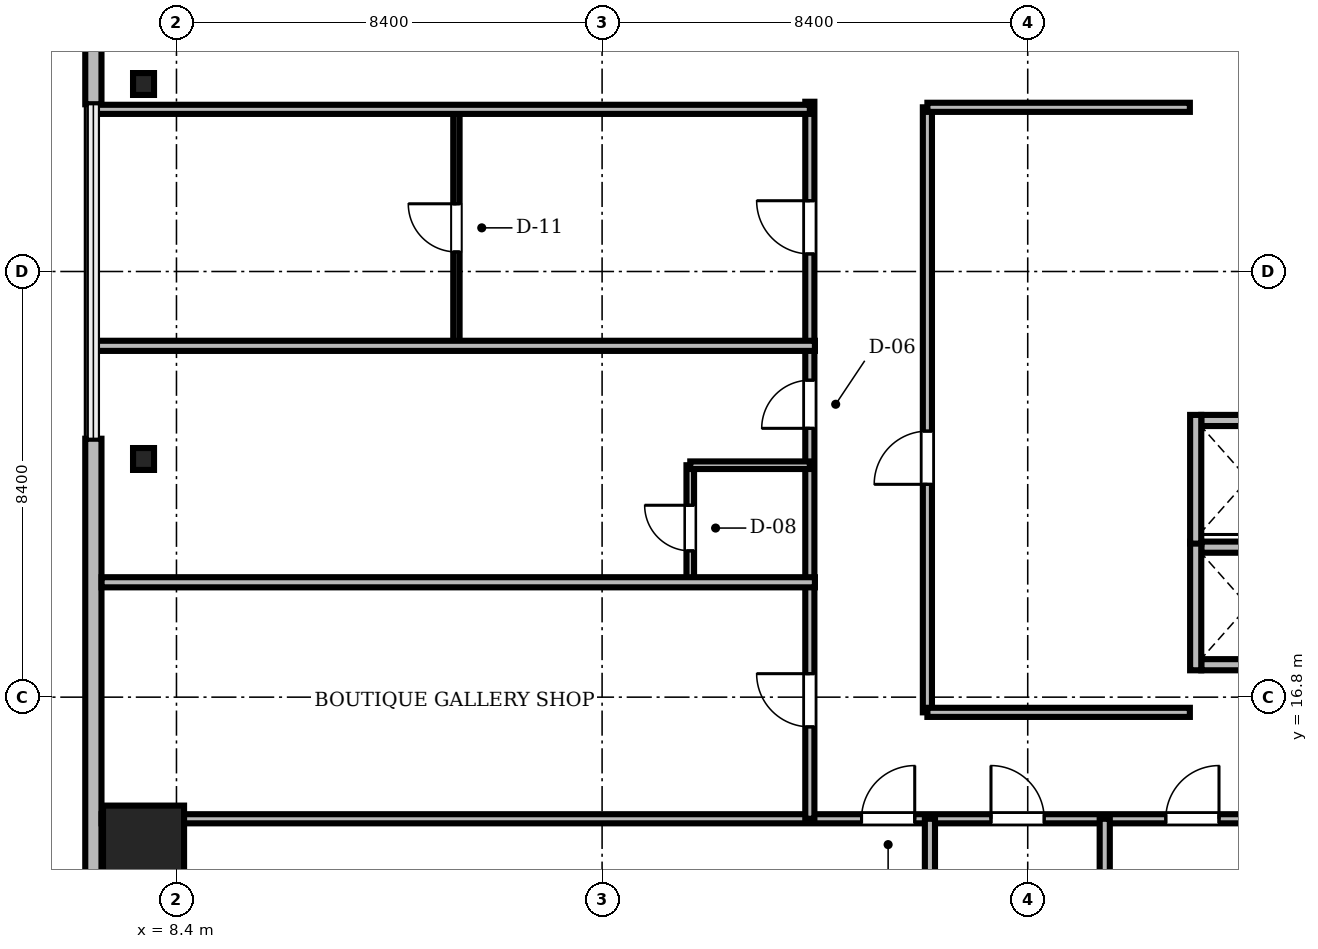
"""IFC4 building model, lengths in metres.
Left out: names, types, materials, properties, quantities, classifications, styles, units other than length and angle.
Written with IfcOpenShell. Run it as: python <this file> out.ifc"""

import sys

from ifc_helpers import new_model, si_unit, direction, frame, frame_2d, origin, origin_2d, place, context, subcontext, project, spatial, rectangle, i_section, extrude, source, transform, mapped, element, fill, save


model = new_model("IFC4")
c1 = context("Model", 3, precision=1e-05, world=origin(), true_north=direction((0.0, 1.0)))
c2 = subcontext(c1, "Body", "Model", "MODEL_VIEW")
j1 = project(units=[si_unit("LENGTHUNIT", "METRE"), si_unit("PLANEANGLEUNIT", "RADIAN")], contexts=[c1])
p1 = place(None, origin())
s1 = spatial("IfcSite", under=j1, at=p1, CompositionType="ELEMENT")
p2 = place(p1, origin())
s2 = spatial("IfcBuilding", under=s1, at=p2, CompositionType="ELEMENT")
p3 = place(p2, frame((0.0, 0.0, 140.9)))
s3 = spatial("IfcBuildingStorey", under=s2, at=p3, CompositionType="ELEMENT", Elevation=140.9)
m1 = source(origin(), c2, "Body", "SweptSolid", [
    extrude(rectangle(XDim=1.6, YDim=1.6, at=origin_2d()), origin(), (0.0, 0.0, 1.0), 3.46),
])
p4 = place(p3, frame((7.75, 13.86, 0.0), z_axis=(0.0, 0.0, 1.0), x_axis=(1.0, 0.0, 0.0)))
e1 = element("IfcColumn", 1, at=p4, inside=s3, PredefinedType="COLUMN", context=c2, shape_type="MappedRepresentation", body=[
    mapped(m1, transform((0.0, 0.0, 0.0), scale=1.0)),
])
m2 = source(origin(), c2, "Body", "SweptSolid", [
    extrude(i_section(OverallWidth=0.414, OverallDepth=0.432, WebThickness=0.026, FlangeThickness=0.04, FilletRadius=0.015, at=origin_2d()), origin(), (0.0, 0.0, 1.0), 3.46),
])
for number, where, z_axis, x_axis in (
    (2, (7.75, 28.9, 0.0), (0.0, 0.0, 1.0), (1.0, 0.0, 0.0)),
    (3, (7.75, 21.5, 0.0), (0.0, 0.0, 1.0), (1.0, 0.0, 0.0)),
):
    element("IfcColumn", number, at=place(p3, frame(where, z_axis=z_axis, x_axis=x_axis)), inside=s3, PredefinedType="COLUMN", context=c2, shape_type="MappedRepresentation", body=[
        mapped(m2, transform((0.0, 0.0, 0.0), scale=1.0)),
    ])
m3 = source(origin(), c2, "Body", "SweptSolid", [
    extrude(rectangle(XDim=15.6, YDim=0.32, at=frame_2d((7.8, 0.0))), origin(), (0.0, 0.0, 1.0), 3.46),
])
p5 = place(p3, frame((6.76, 44.1, 0.0), z_axis=(0.0, 0.0, 1.0), x_axis=(0.0, -1.0, 0.0)))
e4 = element("IfcWall", 4, at=p5, inside=s3, PredefinedType="SOLIDWALL", context=c2, shape_type="MappedRepresentation", body=[
    mapped(m3, transform((0.0, 0.0, 0.0), scale=1.0)),
])
m4 = source(origin(), c2, "Body", "SweptSolid", [
    extrude(rectangle(XDim=1.4, YDim=2.3, at=frame_2d((0.7, 1.15))), frame((0.0, 0.17, 0.0), z_axis=(0.0, -1.0, 0.0), x_axis=(1.0, 0.0, 0.0)), (0.0, 0.0, 1.0), 0.34),
])
p6 = place(p5, frame((9.61, 0.0, 0.0)))
e5 = element("IfcOpeningElement", 5, at=p6, cuts=e4, PredefinedType="OPENING", context=c2, shape_type="MappedRepresentation", body=[
    mapped(m4, transform((0.0, 0.0, 0.0), scale=1.0)),
])
m5 = source(origin(), c2, "Body", "SweptSolid", [
    extrude(rectangle(XDim=2.8, YDim=2.4, at=frame_2d((1.4, 1.2))), frame((0.0, 0.17, 0.0), z_axis=(0.0, -1.0, 0.0), x_axis=(1.0, 0.0, 0.0)), (0.0, 0.0, 1.0), 0.34),
])
p7 = place(p5, frame((2.705, 0.0, 0.72)))
e6 = element("IfcOpeningElement", 6, at=p7, cuts=e4, PredefinedType="OPENING", context=c2, shape_type="MappedRepresentation", body=[
    mapped(m5, transform((0.0, 0.0, 0.0), scale=1.0)),
])
m6 = source(origin(), c2, "Body", "SweptSolid", [
    extrude(rectangle(XDim=15.6, YDim=0.32, at=frame_2d((7.8, 0.0))), origin(), (0.0, 0.0, 1.0), 3.46),
])
p8 = place(p3, frame((6.76, 21.9, 0.0), z_axis=(0.0, 0.0, 1.0), x_axis=(0.0, -1.0, 0.0)))
e7 = element("IfcWall", 7, at=p8, inside=s3, PredefinedType="SOLIDWALL", context=c2, shape_type="MappedRepresentation", body=[
    mapped(m6, transform((0.0, 0.0, 0.0), scale=1.0)),
])
p9 = place(p8, frame((10.095, 0.0, 0.72)))
e8 = element("IfcOpeningElement", 8, at=p9, cuts=e7, PredefinedType="OPENING", context=c2, shape_type="MappedRepresentation", body=[
    mapped(m5, transform((0.0, 0.0, 0.0), scale=1.0)),
])
m7 = source(origin(), c2, "Body", "SweptSolid", [
    extrude(rectangle(XDim=1.85, YDim=0.22, at=frame_2d((0.925, 0.0))), origin(), (0.0, 0.0, 1.0), 3.46),
])
for number, where, z_axis, x_axis in (
    (9, (28.625, 17.44, 0.0), (0.0, 0.0, 1.0), (1.0, 0.0, 0.0)),
    (10, (28.625, 19.76, 0.0), (0.0, 0.0, 1.0), (1.0, 0.0, 0.0)),
):
    element("IfcWall", number, at=place(p3, frame(where, z_axis=z_axis, x_axis=x_axis)), inside=s3, PredefinedType="SOLIDWALL", context=c2, shape_type="MappedRepresentation", body=[
        mapped(m7, transform((0.0, 0.0, 0.0), scale=1.0)),
    ])
m8 = source(origin(), c2, "Body", "SweptSolid", [
    extrude(rectangle(XDim=2.54, YDim=0.22, at=frame_2d((1.27, 0.0))), origin(), (0.0, 0.0, 1.0), 3.46),
])
p10 = place(p3, frame((28.515, 17.33, 0.0), z_axis=(0.0, 0.0, 1.0), x_axis=(0.0, 1.0, 0.0)))
e11 = element("IfcWall", 11, at=p10, inside=s3, PredefinedType="SOLIDWALL", context=c2, shape_type="MappedRepresentation", body=[
    mapped(m8, transform((0.0, 0.0, 0.0), scale=1.0)),
])
p11 = place(p3, frame((28.625, 22.26, 0.0), z_axis=(0.0, 0.0, 1.0), x_axis=(1.0, 0.0, 0.0)))
e12 = element("IfcWall", 12, at=p11, inside=s3, PredefinedType="SOLIDWALL", context=c2, shape_type="MappedRepresentation", body=[
    mapped(m7, transform((0.0, 0.0, 0.0), scale=1.0)),
])
p12 = place(p3, frame((28.515, 19.83, 0.0), z_axis=(0.0, 0.0, 1.0), x_axis=(0.0, 1.0, 0.0)))
e13 = element("IfcWall", 13, at=p12, inside=s3, PredefinedType="SOLIDWALL", context=c2, shape_type="MappedRepresentation", body=[
    mapped(m8, transform((0.0, 0.0, 0.0), scale=1.0)),
])
m9 = source(origin(), c2, "Body", "SweptSolid", [
    extrude(rectangle(XDim=46.156, YDim=0.18, at=frame_2d((23.078, 0.0))), origin(), (0.0, 0.0, 1.0), 2.702),
])
p13 = place(p3, frame((6.922, 14.4, 0.0), z_axis=(0.0, 0.0, 1.0), x_axis=(1.0, 0.0, 0.0)))
e14 = element("IfcWall", 14, at=p13, inside=s3, PredefinedType="PARTITIONING", context=c2, shape_type="MappedRepresentation", body=[
    mapped(m9, transform((0.0, 0.0, 0.0), scale=1.0)),
])
m10 = source(origin(), c2, "Body", "SweptSolid", [
    extrude(rectangle(XDim=1.05, YDim=2.2, at=frame_2d((0.525, 1.1))), frame((0.0, 0.1, 0.0), z_axis=(0.0, -1.0, 0.0), x_axis=(1.0, 0.0, 0.0)), (0.0, 0.0, 1.0), 0.2),
])
p14 = place(p13, frame((14.998, 0.0, 0.0)))
e15 = element("IfcOpeningElement", 15, at=p14, cuts=e14, PredefinedType="OPENING", context=c2, shape_type="MappedRepresentation", body=[
    mapped(m10, transform((0.0, 0.0, 0.0), scale=1.0)),
])
p15 = place(p13, frame((17.553, 0.0, 0.0)))
e16 = element("IfcOpeningElement", 16, at=p15, cuts=e14, PredefinedType="OPENING", context=c2, shape_type="MappedRepresentation", body=[
    mapped(m10, transform((0.0, 0.0, 0.0), scale=1.0)),
])
p16 = place(p13, frame((21.003, 0.0, 0.0)))
e17 = element("IfcOpeningElement", 17, at=p16, cuts=e14, PredefinedType="OPENING", context=c2, shape_type="MappedRepresentation", body=[
    mapped(m10, transform((0.0, 0.0, 0.0), scale=1.0)),
])
p17 = place(p13, frame((24.532, 0.0, 0.0)))
e18 = element("IfcOpeningElement", 18, at=p17, cuts=e14, PredefinedType="OPENING", context=c2, shape_type="MappedRepresentation", body=[
    mapped(m10, transform((0.0, 0.0, 0.0), scale=1.0)),
])
p18 = place(p13, frame((28.338, 0.0, 0.0)))
e19 = element("IfcOpeningElement", 19, at=p18, cuts=e14, PredefinedType="OPENING", context=c2, shape_type="MappedRepresentation", body=[
    mapped(m10, transform((0.0, 0.0, 0.0), scale=1.0)),
])
p19 = place(p13, frame((32.341, 0.0, 0.0)))
e20 = element("IfcOpeningElement", 20, at=p19, cuts=e14, PredefinedType="OPENING", context=c2, shape_type="MappedRepresentation", body=[
    mapped(m10, transform((0.0, 0.0, 0.0), scale=1.0)),
])
p20 = place(p13, frame((37.094, 0.0, 0.0)))
e21 = element("IfcOpeningElement", 21, at=p20, cuts=e14, PredefinedType="OPENING", context=c2, shape_type="MappedRepresentation", body=[
    mapped(m10, transform((0.0, 0.0, 0.0), scale=1.0)),
])
p21 = place(p13, frame((41.828, 0.0, 0.0)))
e22 = element("IfcOpeningElement", 22, at=p21, cuts=e14, PredefinedType="OPENING", context=c2, shape_type="MappedRepresentation", body=[
    mapped(m10, transform((0.0, 0.0, 0.0), scale=1.0)),
])
m11 = source(origin(), c2, "Body", "SweptSolid", [
    extrude(rectangle(XDim=14.15, YDim=0.18, at=frame_2d((7.075, 0.0))), origin(), (0.0, 0.0, 1.0), 2.852),
])
p22 = place(p3, frame((20.9, 14.4, 0.0), z_axis=(0.0, 0.0, 1.0), x_axis=(0.0, 1.0, 0.0)))
e23 = element("IfcWall", 23, at=p22, inside=s3, PredefinedType="PARTITIONING", context=c2, shape_type="MappedRepresentation", body=[
    mapped(m11, transform((0.0, 0.0, 0.0), scale=1.0)),
])
p23 = place(p22, frame((1.813, 0.0, 0.0)))
e24 = element("IfcOpeningElement", 24, at=p23, cuts=e23, PredefinedType="OPENING", context=c2, shape_type="MappedRepresentation", body=[
    mapped(m10, transform((0.0, 0.0, 0.0), scale=1.0)),
])
m12 = source(origin(), c2, "Body", "SweptSolid", [
    extrude(rectangle(XDim=0.95, YDim=2.15, at=frame_2d((0.475, 1.075))), frame((0.0, 0.1, 0.0), z_axis=(0.0, -1.0, 0.0), x_axis=(1.0, 0.0, 0.0)), (0.0, 0.0, 1.0), 0.2),
])
p24 = place(p22, frame((7.705, 0.0, 0.0)))
e25 = element("IfcOpeningElement", 25, at=p24, cuts=e23, PredefinedType="OPENING", context=c2, shape_type="MappedRepresentation", body=[
    mapped(m12, transform((0.0, 0.0, 0.0), scale=1.0)),
])
p25 = place(p22, frame((11.146, 0.0, 0.0)))
e26 = element("IfcOpeningElement", 26, at=p25, cuts=e23, PredefinedType="OPENING", context=c2, shape_type="MappedRepresentation", body=[
    mapped(m10, transform((0.0, 0.0, 0.0), scale=1.0)),
])
m13 = source(origin(), c2, "Body", "SweptSolid", [
    extrude(rectangle(XDim=11.94, YDim=0.18, at=frame_2d((5.97, 0.0))), origin(), (0.0, 0.0, 1.0), 2.852),
])
p26 = place(p3, frame((23.22, 16.5, 0.0), z_axis=(0.0, 0.0, 1.0), x_axis=(0.0, 1.0, 0.0)))
e27 = element("IfcWall", 27, at=p26, inside=s3, PredefinedType="PARTITIONING", context=c2, shape_type="MappedRepresentation", body=[
    mapped(m13, transform((0.0, 0.0, 0.0), scale=1.0)),
])
p27 = place(p26, frame((4.5, 0.0, 0.0)))
e28 = element("IfcOpeningElement", 28, at=p27, cuts=e27, PredefinedType="OPENING", context=c2, shape_type="MappedRepresentation", body=[
    mapped(m10, transform((0.0, 0.0, 0.0), scale=1.0)),
])
m14 = source(origin(), c2, "Body", "SweptSolid", [
    extrude(rectangle(XDim=4.667, YDim=0.125, at=frame_2d((2.333, 0.0))), origin(), (0.0, 0.0, 1.0), 2.852),
])
p28 = place(p3, frame((13.925, 23.733, 0.0), z_axis=(0.0, 0.0, 1.0), x_axis=(0.0, 1.0, 0.0)))
e29 = element("IfcWall", 29, at=p28, inside=s3, PredefinedType="PARTITIONING", context=c2, shape_type="MappedRepresentation", body=[
    mapped(m14, transform((0.0, 0.0, 0.0), scale=1.0)),
])
m15 = source(origin(), c2, "Body", "SweptSolid", [
    extrude(rectangle(XDim=0.95, YDim=2.15, at=frame_2d((0.475, 1.075))), frame((0.0, 0.073, 0.0), z_axis=(0.0, -1.0, 0.0), x_axis=(1.0, 0.0, 0.0)), (0.0, 0.0, 1.0), 0.145),
])
p29 = place(p28, frame((1.853, 0.0, 0.0)))
e30 = element("IfcOpeningElement", 30, at=p29, cuts=e29, PredefinedType="OPENING", context=c2, shape_type="MappedRepresentation", body=[
    mapped(m15, transform((0.0, 0.0, 0.0), scale=1.0)),
])
m16 = source(origin(), c2, "Body", "SweptSolid", [
    extrude(rectangle(XDim=2.29, YDim=0.15, at=frame_2d((1.145, 0.0))), origin(), (0.0, 0.0, 1.0), 2.852),
])
p30 = place(p3, frame((18.54, 19.087, 0.0), z_axis=(0.0, 0.0, 1.0), x_axis=(0.0, 1.0, 0.0)))
e31 = element("IfcWall", 31, at=p30, inside=s3, PredefinedType="PARTITIONING", context=c2, shape_type="MappedRepresentation", body=[
    mapped(m16, transform((0.0, 0.0, 0.0), scale=1.0)),
])
m17 = source(origin(), c2, "Body", "SweptSolid", [
    extrude(rectangle(XDim=0.9, YDim=2.1, at=frame_2d((0.45, 1.05))), frame((0.0, 0.085, 0.0), z_axis=(0.0, -1.0, 0.0), x_axis=(1.0, 0.0, 0.0)), (0.0, 0.0, 1.0), 0.17),
])
p31 = place(p30, frame((0.6, 0.0, 0.0)))
e32 = element("IfcOpeningElement", 32, at=p31, cuts=e31, PredefinedType="OPENING", context=c2, shape_type="MappedRepresentation", body=[
    mapped(m17, transform((0.0, 0.0, 0.0), scale=1.0)),
])
m18 = source(origin(), c2, "Body", "SweptSolid", [
    extrude(rectangle(XDim=14.078, YDim=0.2, at=frame_2d((7.039, 0.0))), origin(), (0.0, 0.0, 1.0), 2.702),
])
p32 = place(p3, frame((6.922, 19.067, 0.0), z_axis=(0.0, 0.0, 1.0), x_axis=(1.0, 0.0, 0.0)))
e33 = element("IfcWall", 33, at=p32, inside=s3, PredefinedType="PARTITIONING", context=c2, shape_type="MappedRepresentation", body=[
    mapped(m18, transform((0.0, 0.0, 0.0), scale=1.0)),
])
m19 = source(origin(), c2, "Body", "SweptSolid", [
    extrude(rectangle(XDim=14.27, YDim=0.2, at=frame_2d((7.135, 0.0))), origin(), (0.0, 0.0, 1.0), 2.702),
])
p33 = place(p3, frame((6.73, 23.733, 0.0), z_axis=(0.0, 0.0, 1.0), x_axis=(1.0, 0.0, 0.0)))
e34 = element("IfcWall", 34, at=p33, inside=s3, PredefinedType="PARTITIONING", context=c2, shape_type="MappedRepresentation", body=[
    mapped(m19, transform((0.0, 0.0, 0.0), scale=1.0)),
])
m20 = source(origin(), c2, "Body", "SweptSolid", [
    extrude(rectangle(XDim=14.17, YDim=0.18, at=frame_2d((7.085, 0.0))), origin(), (0.0, 0.0, 1.0), 2.702),
])
p34 = place(p3, frame((6.73, 28.4, 0.0), z_axis=(0.0, 0.0, 1.0), x_axis=(1.0, 0.0, 0.0)))
e35 = element("IfcWall", 35, at=p34, inside=s3, PredefinedType="PARTITIONING", context=c2, shape_type="MappedRepresentation", body=[
    mapped(m20, transform((0.0, 0.0, 0.0), scale=1.0)),
])
m21 = source(origin(), c2, "Body", "SweptSolid", [
    extrude(rectangle(XDim=12.278, YDim=0.2, at=frame_2d((6.139, 0.0))), origin(), (0.0, 0.0, 1.0), 2.702),
])
p35 = place(p3, frame((23.27, 2.122, 0.0), z_axis=(0.0, 0.0, 1.0), x_axis=(0.0, 1.0, 0.0)))
e36 = element("IfcWall", 36, at=p35, inside=s3, PredefinedType="PARTITIONING", context=c2, shape_type="MappedRepresentation", body=[
    mapped(m21, transform((0.0, 0.0, 0.0), scale=1.0)),
])
m22 = source(origin(), c2, "Body", "SweptSolid", [
    extrude(rectangle(XDim=12.47, YDim=0.2, at=frame_2d((6.235, 0.0))), origin(), (0.0, 0.0, 1.0), 2.702),
])
p36 = place(p3, frame((26.72, 1.93, 0.0), z_axis=(0.0, 0.0, 1.0), x_axis=(0.0, 1.0, 0.0)))
e37 = element("IfcWall", 37, at=p36, inside=s3, PredefinedType="PARTITIONING", context=c2, shape_type="MappedRepresentation", body=[
    mapped(m22, transform((0.0, 0.0, 0.0), scale=1.0)),
])
m23 = source(origin(), c2, "Body", "SweptSolid", [
    extrude(rectangle(XDim=5.18, YDim=0.18, at=frame_2d((2.59, 0.0))), origin(), (0.0, 0.0, 1.0), 3.46),
])
for number, where, z_axis, x_axis in (
    (38, (23.22, 16.5, 0.0), (0.0, 0.0, 1.0), (1.0, 0.0, 0.0)),
    (39, (23.22, 28.44, 0.0), (0.0, 0.0, 1.0), (1.0, 0.0, 0.0)),
):
    element("IfcWall", number, at=place(p3, frame(where, z_axis=z_axis, x_axis=x_axis)), inside=s3, PredefinedType="PARTITIONING", context=c2, shape_type="MappedRepresentation", body=[
        mapped(m23, transform((0.0, 0.0, 0.0), scale=1.0)),
    ])
m24 = source(origin(), c2, "Body", "SweptSolid", [
    extrude(rectangle(XDim=2.36, YDim=0.15, at=frame_2d((1.18, 0.0))), origin(), (0.0, 0.0, 1.0), 3.46),
])
p37 = place(p3, frame((18.54, 21.377, 0.0), z_axis=(0.0, 0.0, 1.0), x_axis=(1.0, 0.0, 0.0)))
e40 = element("IfcWall", 40, at=p37, inside=s3, PredefinedType="PARTITIONING", context=c2, shape_type="MappedRepresentation", body=[
    mapped(m24, transform((0.0, 0.0, 0.0), scale=1.0)),
])
m25 = source(origin(), c2, "Body", "SweptSolid", [
    extrude(rectangle(XDim=1.05, YDim=2.2, at=frame_2d((0.525, 1.1))), frame((0.0, 0.025, 0.0), z_axis=(0.0, -1.0, 0.0), x_axis=(1.0, 0.0, 0.0)), (0.0, 0.0, 1.0), 0.05),
])
p38 = place(p14, origin())
e41 = element("IfcDoor", 41, at=p38, inside=s3, OperationType="SINGLE_SWING_RIGHT", PredefinedType="DOOR", context=c2, shape_type="MappedRepresentation", body=[
    mapped(m25, transform((0.0, 0.0, 0.0), scale=1.0)),
])
fill(e15, e41)
p39 = place(p15, origin())
e42 = element("IfcDoor", 42, at=p39, inside=s3, OperationType="SINGLE_SWING_LEFT", PredefinedType="DOOR", context=c2, shape_type="MappedRepresentation", body=[
    mapped(m25, transform((0.0, 0.0, 0.0), scale=1.0)),
])
fill(e16, e42)
p40 = place(p16, origin())
e43 = element("IfcDoor", 43, at=p40, inside=s3, OperationType="SINGLE_SWING_RIGHT", PredefinedType="DOOR", context=c2, shape_type="MappedRepresentation", body=[
    mapped(m25, transform((0.0, 0.0, 0.0), scale=1.0)),
])
fill(e17, e43)
p41 = place(p23, origin())
e44 = element("IfcDoor", 44, at=p41, inside=s3, OperationType="SINGLE_SWING_RIGHT", PredefinedType="DOOR", context=c2, shape_type="MappedRepresentation", body=[
    mapped(m25, transform((0.0, 0.0, 0.0), scale=1.0)),
])
fill(e24, e44)
m26 = source(origin(), c2, "Body", "SweptSolid", [
    extrude(rectangle(XDim=0.95, YDim=2.15, at=frame_2d((0.475, 1.075))), frame((0.0, 0.025, 0.0), z_axis=(0.0, -1.0, 0.0), x_axis=(1.0, 0.0, 0.0)), (0.0, 0.0, 1.0), 0.05),
])
p42 = place(p24, origin())
e45 = element("IfcDoor", 45, at=p42, inside=s3, OperationType="SINGLE_SWING_LEFT", PredefinedType="DOOR", context=c2, shape_type="MappedRepresentation", body=[
    mapped(m26, transform((0.0, 0.0, 0.0), scale=1.0)),
])
fill(e25, e45)
p43 = place(p25, origin())
e46 = element("IfcDoor", 46, at=p43, inside=s3, OperationType="SINGLE_SWING_RIGHT", PredefinedType="DOOR", context=c2, shape_type="MappedRepresentation", body=[
    mapped(m25, transform((0.0, 0.0, 0.0), scale=1.0)),
])
fill(e26, e46)
p44 = place(p27, origin())
e47 = element("IfcDoor", 47, at=p44, inside=s3, OperationType="SINGLE_SWING_LEFT", PredefinedType="DOOR", context=c2, shape_type="MappedRepresentation", body=[
    mapped(m25, transform((0.0, 0.0, 0.0), scale=1.0)),
])
fill(e28, e47)
p45 = place(p29, origin())
e48 = element("IfcDoor", 48, at=p45, inside=s3, OperationType="SINGLE_SWING_RIGHT", PredefinedType="DOOR", context=c2, shape_type="MappedRepresentation", body=[
    mapped(m26, transform((0.0, 0.0, 0.0), scale=1.0)),
])
fill(e30, e48)
m27 = source(origin(), c2, "Body", "SweptSolid", [
    extrude(rectangle(XDim=0.9, YDim=2.1, at=frame_2d((0.45, 1.05))), frame((0.0, 0.025, 0.0), z_axis=(0.0, -1.0, 0.0), x_axis=(1.0, 0.0, 0.0)), (0.0, 0.0, 1.0), 0.05),
])
p46 = place(p31, origin())
e49 = element("IfcDoor", 49, at=p46, inside=s3, OperationType="SINGLE_SWING_RIGHT", PredefinedType="DOOR", context=c2, shape_type="MappedRepresentation", body=[
    mapped(m27, transform((0.0, 0.0, 0.0), scale=1.0)),
])
fill(e32, e49)
save(model, sys.argv[1])
